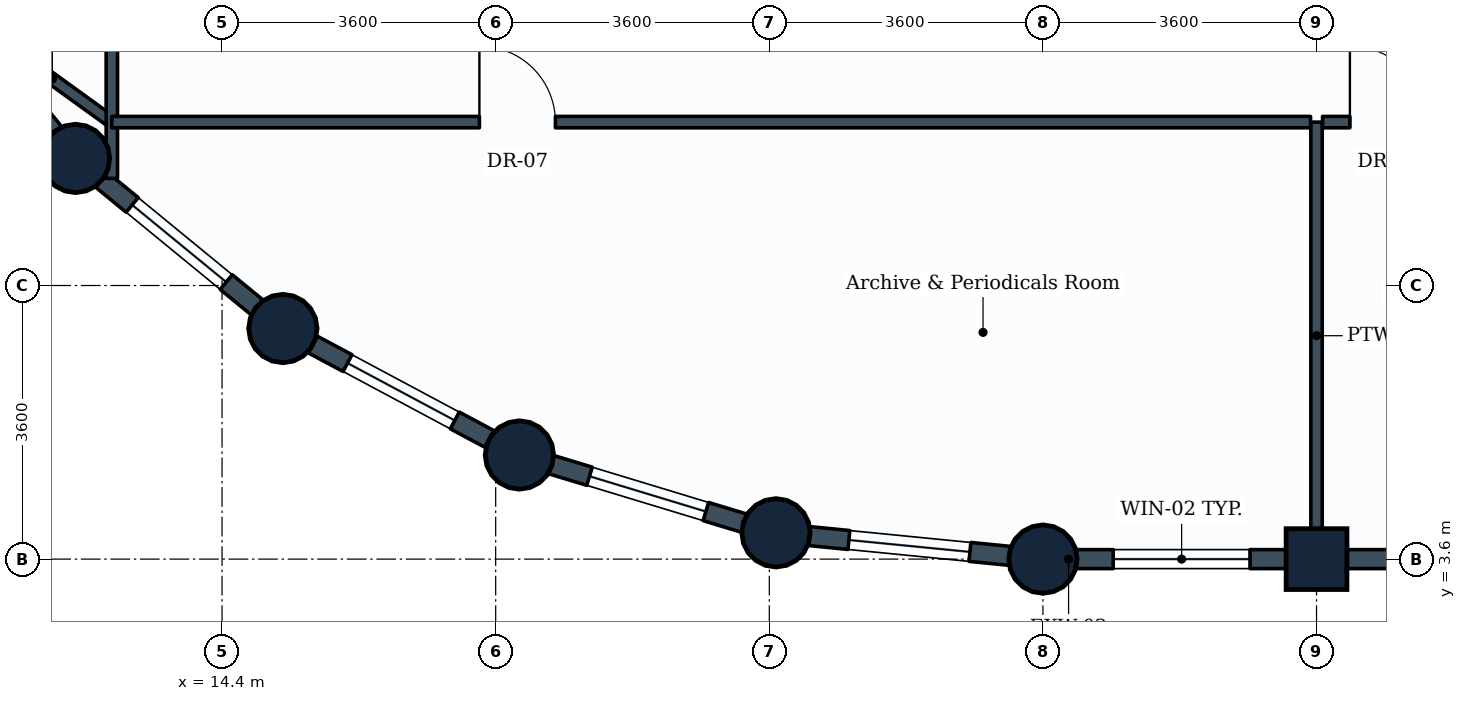
"""IFC4 building model, lengths in metres.
Left out: names, types, materials, properties, quantities, classifications, styles, units other than length and angle.
Written with IfcOpenShell. Run it as: python <this file> out.ifc"""

import sys

from ifc_helpers import new_model, si_unit, direction, frame, frame_2d, origin, origin_2d, place, context, subcontext, project, spatial, rectangle, circle, extrude, element, fill, save


model = new_model("IFC4")
c1 = context("Model", 3, precision=1e-05, world=origin(), true_north=direction((0.0, 1.0)))
c2 = subcontext(c1, "Body", "Model", "MODEL_VIEW")
j1 = project(units=[si_unit("LENGTHUNIT", "METRE"), si_unit("PLANEANGLEUNIT", "RADIAN")], contexts=[c1])
p1 = place(None, origin())
s1 = spatial("IfcSite", under=j1, at=p1, CompositionType="ELEMENT")
p2 = place(p1, origin())
s2 = spatial("IfcBuilding", under=s1, at=p2, CompositionType="ELEMENT")
p3 = place(p2, frame((0.0, 0.0, 266.6)))
s3 = spatial("IfcBuildingStorey", under=s2, at=p3, CompositionType="ELEMENT", Elevation=266.6)
for number, where, z_axis, x_axis in (
    (1, (12.472, 8.872, 0.0), (0.0, 0.0, 1.0), (1.0, 0.0, 0.0)),
    (2, (15.2, 6.634, 0.0), (0.0, 0.0, 1.0), (1.0, 0.0, 0.0)),
    (3, (18.312, 4.97, 0.0), (0.0, 0.0, 1.0), (1.0, 0.0, 0.0)),
    (4, (21.688, 3.946, 0.0), (0.0, 0.0, 1.0), (1.0, 0.0, 0.0)),
    (5, (25.2, 3.6, 0.0), (0.0, 0.0, 1.0), (1.0, 0.0, 0.0)),
):
    element("IfcColumn", number, at=place(p3, frame(where, z_axis=z_axis, x_axis=x_axis)), inside=s3, PredefinedType="COLUMN", context=c2, shape_type="SweptSolid", body=[
        extrude(circle(Radius=0.45, at=origin_2d()), origin(), (0.0, 0.0, 1.0), 3.6),
    ])
p4 = place(p3, frame((28.8, 3.6, 0.0), z_axis=(0.0, 0.0, 1.0), x_axis=(1.0, 0.0, 0.0)))
e6 = element("IfcColumn", 6, at=p4, inside=s3, PredefinedType="COLUMN", context=c2, shape_type="SweptSolid", body=[
    extrude(rectangle(XDim=0.8, YDim=0.8, at=origin_2d()), origin(), (0.0, 0.0, 1.0), 3.6),
])
p5 = place(p3, frame((28.8, 3.6, 0.0), z_axis=(0.0, 0.0, 1.0), x_axis=(-1.0, 0.0, 0.0)))
e7 = element("IfcWall", 7, at=p5, inside=s3, PredefinedType="STANDARD", context=c2, shape_type="SweptSolid", body=[
    extrude(rectangle(XDim=3.6, YDim=0.25, at=frame_2d((1.8, 0.0))), origin(), (0.0, 0.0, 1.0), 2.83),
])
p6 = place(p5, frame((0.875, 0.0, 0.85)))
e8 = element("IfcOpeningElement", 8, at=p6, cuts=e7, PredefinedType="OPENING", context=c2, shape_type="SweptSolid", body=[
    extrude(rectangle(XDim=1.8, YDim=1.35, at=frame_2d((0.9, 0.675))), frame((0.0, 0.135, 0.0), z_axis=(0.0, -1.0, 0.0), x_axis=(1.0, 0.0, 0.0)), (0.0, 0.0, 1.0), 0.27),
])
p7 = place(p3, frame((32.4, 3.6, 0.0), z_axis=(0.0, 0.0, 1.0), x_axis=(-1.0, 0.0, 0.0)))
e9 = element("IfcWall", 9, at=p7, inside=s3, PredefinedType="STANDARD", context=c2, shape_type="SweptSolid", body=[
    extrude(rectangle(XDim=3.6, YDim=0.25, at=frame_2d((1.8, 0.0))), origin(), (0.0, 0.0, 1.0), 2.83),
])
p8 = place(p3, frame((12.472, 8.872, 0.0), z_axis=(0.0, 0.0, 1.0), x_axis=(-0.634258295121, 0.773121216285, 0.0)))
e10 = element("IfcWall", 10, at=p8, inside=s3, PredefinedType="STANDARD", context=c2, shape_type="SweptSolid", body=[
    extrude(rectangle(XDim=3.529, YDim=0.25, at=frame_2d((1.764, 0.0))), origin(), (0.0, 0.0, 1.0), 2.83),
])
p9 = place(p3, frame((15.2, 6.634, 0.0), z_axis=(0.0, 0.0, 1.0), x_axis=(-0.773121216285, 0.634258295121, 0.0)))
e11 = element("IfcWall", 11, at=p9, inside=s3, PredefinedType="STANDARD", context=c2, shape_type="SweptSolid", body=[
    extrude(rectangle(XDim=3.529, YDim=0.25, at=frame_2d((1.764, 0.0))), origin(), (0.0, 0.0, 1.0), 2.83),
])
p10 = place(p9, frame((0.964, 0.0, 0.85)))
e12 = element("IfcOpeningElement", 12, at=p10, cuts=e11, PredefinedType="OPENING", context=c2, shape_type="SweptSolid", body=[
    extrude(rectangle(XDim=1.6, YDim=1.35, at=frame_2d((0.8, 0.675))), frame((0.0, 0.135, 0.0), z_axis=(0.0, -1.0, 0.0), x_axis=(1.0, 0.0, 0.0)), (0.0, 0.0, 1.0), 0.27),
])
p11 = place(p3, frame((18.312, 4.97, 0.0), z_axis=(0.0, 0.0, 1.0), x_axis=(-0.881846862014, 0.471535907389, 0.0)))
e13 = element("IfcWall", 13, at=p11, inside=s3, PredefinedType="STANDARD", context=c2, shape_type="SweptSolid", body=[
    extrude(rectangle(XDim=3.529, YDim=0.25, at=frame_2d((1.765, 0.0))), origin(), (0.0, 0.0, 1.0), 2.83),
])
p12 = place(p11, frame((0.964, 0.0, 0.85)))
e14 = element("IfcOpeningElement", 14, at=p12, cuts=e13, PredefinedType="OPENING", context=c2, shape_type="SweptSolid", body=[
    extrude(rectangle(XDim=1.6, YDim=1.35, at=frame_2d((0.8, 0.675))), frame((0.0, 0.135, 0.0), z_axis=(0.0, -1.0, 0.0), x_axis=(1.0, 0.0, 0.0)), (0.0, 0.0, 1.0), 0.27),
])
p13 = place(p3, frame((21.688, 3.946, 0.0), z_axis=(0.0, 0.0, 1.0), x_axis=(-0.956953367403, 0.290241714123, 0.0)))
e15 = element("IfcWall", 15, at=p13, inside=s3, PredefinedType="STANDARD", context=c2, shape_type="SweptSolid", body=[
    extrude(rectangle(XDim=3.528, YDim=0.25, at=frame_2d((1.764, 0.0))), origin(), (0.0, 0.0, 1.0), 2.83),
])
p14 = place(p13, frame((0.964, 0.0, 0.85)))
e16 = element("IfcOpeningElement", 16, at=p14, cuts=e15, PredefinedType="OPENING", context=c2, shape_type="SweptSolid", body=[
    extrude(rectangle(XDim=1.6, YDim=1.35, at=frame_2d((0.8, 0.675))), frame((0.0, 0.135, 0.0), z_axis=(0.0, -1.0, 0.0), x_axis=(1.0, 0.0, 0.0)), (0.0, 0.0, 1.0), 0.27),
])
p15 = place(p3, frame((25.2, 3.6, 0.0), z_axis=(0.0, 0.0, 1.0), x_axis=(-0.995183369056, 0.098030923459, 0.0)))
e17 = element("IfcWall", 17, at=p15, inside=s3, PredefinedType="STANDARD", context=c2, shape_type="SweptSolid", body=[
    extrude(rectangle(XDim=3.529, YDim=0.25, at=frame_2d((1.765, 0.0))), origin(), (0.0, 0.0, 1.0), 2.83),
])
p16 = place(p15, frame((0.965, 0.0, 0.85)))
e18 = element("IfcOpeningElement", 18, at=p16, cuts=e17, PredefinedType="OPENING", context=c2, shape_type="SweptSolid", body=[
    extrude(rectangle(XDim=1.6, YDim=1.35, at=frame_2d((0.8, 0.675))), frame((0.0, 0.135, 0.0), z_axis=(0.0, -1.0, 0.0), x_axis=(1.0, 0.0, 0.0)), (0.0, 0.0, 1.0), 0.27),
])
p17 = place(p3, frame((28.8, 9.35, 0.0), z_axis=(0.0, 0.0, 1.0), x_axis=(0.0, -1.0, 0.0)))
e19 = element("IfcWall", 19, at=p17, inside=s3, PredefinedType="PARTITIONING", context=c2, shape_type="SweptSolid", body=[
    extrude(rectangle(XDim=5.621, YDim=0.15, at=frame_2d((2.811, 0.0))), origin(), (0.0, 0.0, 1.0), 3.335),
])
p18 = place(p3, frame((12.95, 9.35, 0.0), z_axis=(0.0, 0.0, 1.0), x_axis=(-0.8106792284, 0.585490553844, 0.0)))
e20 = element("IfcWall", 20, at=p18, inside=s3, PredefinedType="PARTITIONING", context=c2, shape_type="SweptSolid", body=[
    extrude(rectangle(XDim=1.93, YDim=0.15, at=frame_2d((0.965, 0.0))), origin(), (0.0, 0.0, 1.0), 2.83),
])
p19 = place(p3, frame((12.95, 8.609, 0.0), z_axis=(0.0, 0.0, 1.0), x_axis=(0.0, 1.0, 0.0)))
e21 = element("IfcWall", 21, at=p19, inside=s3, PredefinedType="PARTITIONING", context=c2, shape_type="SweptSolid", body=[
    extrude(rectangle(XDim=7.652, YDim=0.15, at=frame_2d((3.826, 0.0))), origin(), (0.0, 0.0, 1.0), 2.83),
])
p20 = place(p19, frame((4.972, 0.0, 0.0)))
e22 = element("IfcOpeningElement", 22, at=p20, cuts=e21, PredefinedType="OPENING", context=c2, shape_type="SweptSolid", body=[
    extrude(rectangle(XDim=1.0, YDim=2.1, at=frame_2d((0.5, 1.05))), frame((0.0, 0.085, 0.0), z_axis=(0.0, -1.0, 0.0), x_axis=(1.0, 0.0, 0.0)), (0.0, 0.0, 1.0), 0.17),
])
p21 = place(p3, frame((12.95, 9.35, 0.0), z_axis=(0.0, 0.0, 1.0), x_axis=(1.0, 0.0, 0.0)))
e23 = element("IfcWall", 23, at=p21, inside=s3, PredefinedType="PARTITIONING", context=c2, shape_type="SweptSolid", body=[
    extrude(rectangle(XDim=15.771, YDim=0.15, at=frame_2d((7.885, 0.0))), origin(), (0.0, 0.0, 1.0), 3.02),
])
p22 = place(p21, frame((4.836, 0.0, 0.0)))
e24 = element("IfcOpeningElement", 24, at=p22, cuts=e23, PredefinedType="OPENING", context=c2, shape_type="SweptSolid", body=[
    extrude(rectangle(XDim=1.0, YDim=2.1, at=frame_2d((0.5, 1.05))), frame((0.0, 0.085, 0.0), z_axis=(0.0, -1.0, 0.0), x_axis=(1.0, 0.0, 0.0)), (0.0, 0.0, 1.0), 0.17),
])
p23 = place(p3, frame((28.879, 9.35, 0.0), z_axis=(0.0, 0.0, 1.0), x_axis=(1.0, 0.0, 0.0)))
e25 = element("IfcWall", 25, at=p23, inside=s3, PredefinedType="PARTITIONING", context=c2, shape_type="SweptSolid", body=[
    extrude(rectangle(XDim=5.521, YDim=0.15, at=frame_2d((2.76, 0.0))), origin(), (0.0, 0.0, 1.0), 3.335),
])
p24 = place(p23, frame((0.36, 0.0, 0.0)))
e26 = element("IfcOpeningElement", 26, at=p24, cuts=e25, PredefinedType="OPENING", context=c2, shape_type="SweptSolid", body=[
    extrude(rectangle(XDim=1.0, YDim=2.1, at=frame_2d((0.5, 1.05))), frame((0.0, 0.085, 0.0), z_axis=(0.0, -1.0, 0.0), x_axis=(1.0, 0.0, 0.0)), (0.0, 0.0, 1.0), 0.17),
])
p25 = place(p6, origin())
e27 = element("IfcWindow", 27, at=p25, inside=s3, PartitioningType="SINGLE_PANEL", PredefinedType="WINDOW", context=c2, shape_type="SweptSolid", body=[
    extrude(rectangle(XDim=1.8, YDim=1.35, at=frame_2d((0.9, 0.675))), frame((0.0, 0.03, 0.0), z_axis=(0.0, -1.0, 0.0), x_axis=(1.0, 0.0, 0.0)), (0.0, 0.0, 1.0), 0.06),
])
fill(e8, e27)
p26 = place(p10, origin())
e28 = element("IfcWindow", 28, at=p26, inside=s3, PartitioningType="SINGLE_PANEL", PredefinedType="WINDOW", context=c2, shape_type="SweptSolid", body=[
    extrude(rectangle(XDim=1.6, YDim=1.35, at=frame_2d((0.8, 0.675))), frame((0.0, 0.03, 0.0), z_axis=(0.0, -1.0, 0.0), x_axis=(1.0, 0.0, 0.0)), (0.0, 0.0, 1.0), 0.06),
])
fill(e12, e28)
p27 = place(p12, origin())
e29 = element("IfcWindow", 29, at=p27, inside=s3, PartitioningType="SINGLE_PANEL", PredefinedType="WINDOW", context=c2, shape_type="SweptSolid", body=[
    extrude(rectangle(XDim=1.6, YDim=1.35, at=frame_2d((0.8, 0.675))), frame((0.0, 0.03, 0.0), z_axis=(0.0, -1.0, 0.0), x_axis=(1.0, 0.0, 0.0)), (0.0, 0.0, 1.0), 0.06),
])
fill(e14, e29)
p28 = place(p14, origin())
e30 = element("IfcWindow", 30, at=p28, inside=s3, PartitioningType="SINGLE_PANEL", PredefinedType="WINDOW", context=c2, shape_type="SweptSolid", body=[
    extrude(rectangle(XDim=1.6, YDim=1.35, at=frame_2d((0.8, 0.675))), frame((0.0, 0.03, 0.0), z_axis=(0.0, -1.0, 0.0), x_axis=(1.0, 0.0, 0.0)), (0.0, 0.0, 1.0), 0.06),
])
fill(e16, e30)
p29 = place(p16, origin())
e31 = element("IfcWindow", 31, at=p29, inside=s3, PartitioningType="SINGLE_PANEL", PredefinedType="WINDOW", context=c2, shape_type="SweptSolid", body=[
    extrude(rectangle(XDim=1.6, YDim=1.35, at=frame_2d((0.8, 0.675))), frame((0.0, 0.03, 0.0), z_axis=(0.0, -1.0, 0.0), x_axis=(1.0, 0.0, 0.0)), (0.0, 0.0, 1.0), 0.06),
])
fill(e18, e31)
p30 = place(p22, origin())
e32 = element("IfcDoor", 32, at=p30, inside=s3, OperationType="SINGLE_SWING_LEFT", PredefinedType="DOOR", context=c2, shape_type="SweptSolid", body=[
    extrude(rectangle(XDim=1.0, YDim=2.1, at=frame_2d((0.5, 1.05))), frame((0.0, 0.025, 0.0), z_axis=(0.0, -1.0, 0.0), x_axis=(1.0, 0.0, 0.0)), (0.0, 0.0, 1.0), 0.05),
])
fill(e24, e32)
p31 = place(p24, origin())
e33 = element("IfcDoor", 33, at=p31, inside=s3, OperationType="SINGLE_SWING_LEFT", PredefinedType="DOOR", context=c2, shape_type="SweptSolid", body=[
    extrude(rectangle(XDim=1.0, YDim=2.1, at=frame_2d((0.5, 1.05))), frame((0.0, 0.025, 0.0), z_axis=(0.0, -1.0, 0.0), x_axis=(1.0, 0.0, 0.0)), (0.0, 0.0, 1.0), 0.05),
])
fill(e26, e33)
save(model, sys.argv[1])
